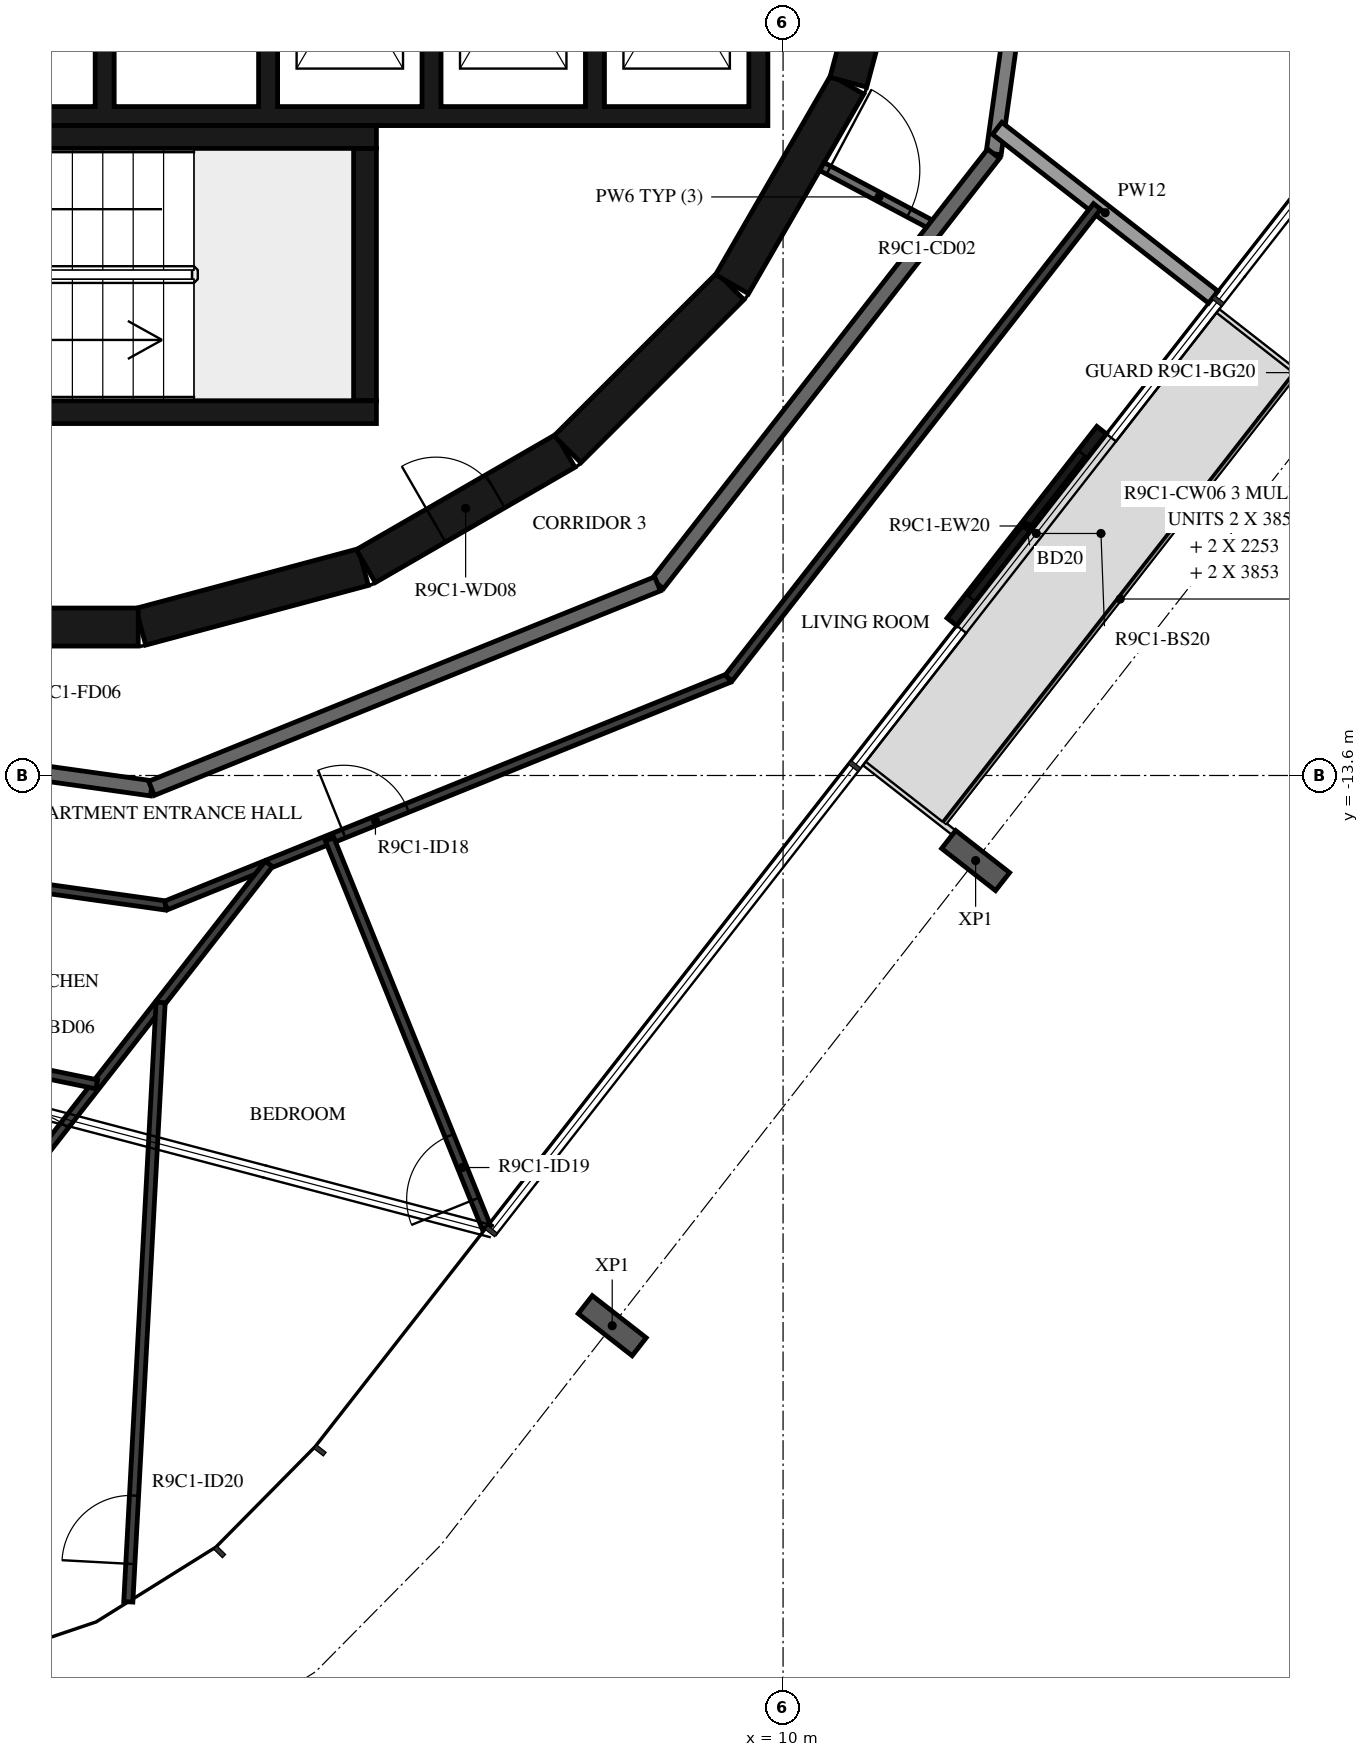
"""IFC4 building model, lengths in metres.
Left out: names, types, materials, properties, quantities, classifications, styles, units other than length and angle.
Written with IfcOpenShell. Run it as: python <this file> out.ifc"""

import sys

from ifc_helpers import new_model, si_unit, direction, frame, frame_2d, origin, origin_2d, place, context, subcontext, project, spatial, polyline, rectangle, i_section, outline, extrude, element, fill, save


model = new_model("IFC4")
c1 = context("Model", 3, precision=1e-05, world=origin(), true_north=direction((0.0, 1.0)))
c2 = subcontext(c1, "Body", "Model", "MODEL_VIEW")
j1 = project(units=[si_unit("LENGTHUNIT", "METRE"), si_unit("PLANEANGLEUNIT", "RADIAN")], contexts=[c1])
p1 = place(None, origin())
s1 = spatial("IfcSite", under=j1, at=p1, CompositionType="ELEMENT")
p2 = place(p1, origin())
s2 = spatial("IfcBuilding", under=s1, at=p2, CompositionType="ELEMENT")
p3 = place(p2, frame((0.0, 0.0, 357.5)))
s3 = spatial("IfcBuildingStorey", under=s2, at=p3, CompositionType="ELEMENT", Elevation=357.5)
for number, where, z_axis, x_axis in (
    (1, (7.752, -20.839, -0.38), (0.0, 0.0, 1.0), (-0.616, -0.788, 0.0)),
    (2, (12.533, -14.719, -0.38), (0.0, 0.0, 1.0), (-0.616, -0.788, 0.0)),
):
    element("IfcColumn", number, at=place(p3, frame(where, z_axis=z_axis, x_axis=x_axis)), inside=s3, PredefinedType="COLUMN", context=c2, shape_type="SweptSolid", body=[
        extrude(i_section(OverallWidth=0.3, OverallDepth=0.9, WebThickness=0.019, FlangeThickness=0.035, FilletRadius=0.03, at=origin_2d()), origin(), (0.0, 0.0, 1.0), 3.5),
    ])
p4 = place(p3, frame((12.221, -11.578, 0.0), z_axis=(0.0, 0.0, 1.0), x_axis=(0.615666248856, 0.788007024093, 0.0)))
e3 = element("IfcWall", 3, at=p4, inside=s3, PredefinedType="STANDARD", context=c2, shape_type="SweptSolid", body=[
    extrude(rectangle(XDim=3.2, YDim=0.16, at=frame_2d((1.6, 0.0))), origin(), (0.0, 0.0, 1.0), 3.12),
])
p5 = place(p4, frame((0.4, 0.0, 0.0)))
e4 = element("IfcOpeningElement", 4, at=p5, cuts=e3, PredefinedType="OPENING", context=c2, shape_type="SweptSolid", body=[
    extrude(rectangle(XDim=2.4, YDim=2.4, at=frame_2d((1.2, 1.2))), frame((0.0, 0.09, 0.0), z_axis=(0.0, -1.0, 0.0), x_axis=(1.0, 0.0, 0.0)), (0.0, 0.0, 1.0), 0.18),
])
p6 = place(p3, frame((1.55, -11.643, 0.0), z_axis=(0.0, 0.0, 1.0), x_axis=(0.965948410781, 0.258734743916, 0.0)))
e5 = element("IfcWall", 5, at=p6, inside=s3, PredefinedType="SHEAR", context=c2, shape_type="SweptSolid", body=[
    extrude(rectangle(XDim=3.033, YDim=0.5, at=frame_2d((1.516, 0.0))), origin(), (0.0, 0.0, 1.0), 3.12),
])
p7 = place(p3, frame((4.51, -10.845, 0.0), z_axis=(0.0, 0.0, 1.0), x_axis=(0.865975092491, 0.500087131594, 0.0)))
e6 = element("IfcWall", 6, at=p7, inside=s3, PredefinedType="SHEAR", context=c2, shape_type="SweptSolid", body=[
    extrude(rectangle(XDim=3.033, YDim=0.5, at=frame_2d((1.516, 0.0))), origin(), (0.0, 0.0, 1.0), 3.12),
])
p8 = place(p7, frame((1.066, 0.0, 0.0)))
e7 = element("IfcOpeningElement", 7, at=p8, cuts=e6, PredefinedType="OPENING", context=c2, shape_type="SweptSolid", body=[
    extrude(rectangle(XDim=0.9, YDim=2.1, at=frame_2d((0.45, 1.05))), frame((0.0, 0.26, 0.0), z_axis=(0.0, -1.0, 0.0), x_axis=(1.0, 0.0, 0.0)), (0.0, 0.0, 1.0), 0.52),
])
p9 = place(p3, frame((7.164, -9.308, 0.0), z_axis=(0.0, 0.0, 1.0), x_axis=(0.707106781187, 0.707106781187, 0.0)))
e8 = element("IfcWall", 8, at=p9, inside=s3, PredefinedType="SHEAR", context=c2, shape_type="SweptSolid", body=[
    extrude(rectangle(XDim=3.032, YDim=0.5, at=frame_2d((1.516, 0.0))), origin(), (0.0, 0.0, 1.0), 3.12),
])
for number, where, z_axis, x_axis in (
    (9, (9.329, -7.137, 0.0), (0.0, 0.0, 1.0), (0.5, 0.866, 0.0)),
    (10, (10.858, -4.479, 0.0), (0.0, 0.0, 1.0), (0.259, 0.966, 0.0)),
):
    element("IfcWall", number, at=place(p3, frame(where, z_axis=z_axis, x_axis=x_axis)), inside=s3, PredefinedType="SHEAR", context=c2, shape_type="SweptSolid", body=[
        extrude(rectangle(XDim=3.033, YDim=0.5, at=frame_2d((1.516, 0.0))), origin(), (0.0, 0.0, 1.0), 3.12),
    ])
p10 = place(p3, frame((-1.516, -11.647, 0.0), z_axis=(0.0, 0.0, 1.0), x_axis=(1.0, 0.0, 0.0)))
e11 = element("IfcWall", 11, at=p10, inside=s3, PredefinedType="SHEAR", context=c2, shape_type="SweptSolid", body=[
    extrude(rectangle(XDim=3.033, YDim=0.5, at=frame_2d((1.516, 0.0))), origin(), (0.0, 0.0, 1.0), 3.12),
])
p11 = place(p10, frame((0.016, 0.0, 0.0)))
e12 = element("IfcOpeningElement", 12, at=p11, cuts=e11, PredefinedType="OPENING", context=c2, shape_type="SweptSolid", body=[
    extrude(rectangle(XDim=1.2, YDim=2.1, at=frame_2d((0.6, 1.05))), frame((0.0, 0.26, 0.0), z_axis=(0.0, -1.0, 0.0), x_axis=(1.0, 0.0, 0.0)), (0.0, 0.0, 1.0), 0.52),
])
p12 = place(p3, frame((-2.4, -5.2, 0.0), z_axis=(0.0, 0.0, 1.0), x_axis=(1.0, 0.0, 0.0)))
e13 = element("IfcWall", 13, at=p12, inside=s3, PredefinedType="SHEAR", context=c2, shape_type="SweptSolid", body=[
    extrude(rectangle(XDim=7.05, YDim=0.3, at=frame_2d((3.525, 0.0))), origin(), (0.0, 0.0, 1.0), 3.12),
])
p13 = place(p3, frame((4.5, -8.67, 0.0), z_axis=(0.0, 0.0, 1.0), x_axis=(0.0, 1.0, 0.0)))
e14 = element("IfcWall", 14, at=p13, inside=s3, PredefinedType="SHEAR", context=c2, shape_type="SweptSolid", body=[
    extrude(rectangle(XDim=3.32, YDim=0.3, at=frame_2d((1.66, 0.0))), origin(), (0.0, 0.0, 1.0), 3.12),
])
p14 = place(p3, frame((0.1, -8.82, 0.0), z_axis=(0.0, 0.0, 1.0), x_axis=(1.0, 0.0, 0.0)))
e15 = element("IfcWall", 15, at=p14, inside=s3, PredefinedType="SHEAR", context=c2, shape_type="SweptSolid", body=[
    extrude(rectangle(XDim=4.55, YDim=0.3, at=frame_2d((2.275, 0.0))), origin(), (0.0, 0.0, 1.0), 3.12),
])
p15 = place(p3, origin())
e16 = element("IfcWall", 16, at=p15, inside=s3, PredefinedType="SHEAR", context=c2, shape_type="SweptSolid", body=[
    extrude(outline(polyline([(9.8, -5.05), (9.8, -4.8), (9.8, -1.9), (9.55, -1.9), (9.55, -4.8), (7.65, -4.8), (7.65, -1.9), (7.4, -1.9), (7.4, -4.8), (5.5, -4.8), (5.5, -1.9), (5.25, -1.9), (5.25, -4.8), (3.35, -4.8), (3.35, -1.9), (3.1, -1.9), (3.1, -4.8), (1.2, -4.8), (1.2, -1.9), (0.95, -1.9), (0.95, -4.8), (-0.95, -4.8), (-0.95, -1.9), (-1.2, -1.9), (-1.2, -4.8), (-3.1, -4.8), (-3.1, -1.9), (-3.35, -1.9), (-3.35, -4.8), (-5.25, -4.8), (-5.25, -1.9), (-5.5, -1.9), (-5.5, -4.8), (-9.55, -4.8), (-9.55, -1.9), (-9.8, -1.9), (-9.8, -4.8), (-9.8, -5.05), (9.8, -5.05)])), origin(), (0.0, 0.0, 1.0), 3.12),
])
p16 = place(p3, frame((10.511, -5.589, 0.0), z_axis=(0.0, 0.0, 1.0), x_axis=(0.882959677414, -0.469448834337, 0.0)))
e17 = element("IfcWall", 17, at=p16, inside=s3, PredefinedType="PARTITIONING", context=c2, shape_type="SweptSolid", body=[
    extrude(rectangle(XDim=1.702, YDim=0.12, at=frame_2d((0.851, 0.0))), origin(), (0.0, 0.0, 1.0), 3.12),
])
p17 = place(p16, frame((0.1, 0.0, 0.0)))
e18 = element("IfcOpeningElement", 18, at=p17, cuts=e17, PredefinedType="OPENING", context=c2, shape_type="SweptSolid", body=[
    extrude(rectangle(XDim=1.2, YDim=2.1, at=frame_2d((0.6, 1.05))), frame((0.0, 0.07, 0.0), z_axis=(0.0, -1.0, 0.0), x_axis=(1.0, 0.0, 0.0)), (0.0, 0.0, 1.0), 0.14),
])
p18 = place(p3, frame((12.77, -5.42, 0.0), z_axis=(0.0, 0.0, 1.0), x_axis=(0.139155334385, 0.990270565508, 0.0)))
e19 = element("IfcWall", 19, at=p18, inside=s3, PredefinedType="STANDARD", context=c2, shape_type="SweptSolid", body=[
    extrude(rectangle(XDim=7.181, YDim=0.2, at=frame_2d((3.59, 0.0))), origin(), (0.0, 0.0, 1.0), 3.12),
])
p19 = place(p18, frame((2.039, 0.0, 0.0)))
e20 = element("IfcOpeningElement", 20, at=p19, cuts=e19, PredefinedType="OPENING", context=c2, shape_type="SweptSolid", body=[
    extrude(rectangle(XDim=1.8, YDim=2.1, at=frame_2d((0.9, 1.05))), frame((0.0, 0.11, 0.0), z_axis=(0.0, -1.0, 0.0), x_axis=(1.0, 0.0, 0.0)), (0.0, 0.0, 1.0), 0.22),
])
p20 = place(p3, frame((8.349, -11.079, 0.0), z_axis=(0.0, 0.0, 1.0), x_axis=(0.615669112324, 0.78800478687, 0.0)))
e21 = element("IfcWall", 21, at=p20, inside=s3, PredefinedType="STANDARD", context=c2, shape_type="SweptSolid", body=[
    extrude(rectangle(XDim=7.181, YDim=0.2, at=frame_2d((3.591, 0.0))), origin(), (0.0, 0.0, 1.0), 3.12),
])
p21 = place(p3, frame((-5.42, -12.77, 0.0), z_axis=(0.0, 0.0, 1.0), x_axis=(0.990270565508, -0.139155334385, 0.0)))
e22 = element("IfcWall", 22, at=p21, inside=s3, PredefinedType="STANDARD", context=c2, shape_type="SweptSolid", body=[
    extrude(rectangle(XDim=7.181, YDim=0.2, at=frame_2d((3.59, 0.0))), origin(), (0.0, 0.0, 1.0), 3.12),
])
p22 = place(p21, frame((2.39, 0.0, 0.0)))
e23 = element("IfcOpeningElement", 23, at=p22, cuts=e22, PredefinedType="OPENING", context=c2, shape_type="SweptSolid", body=[
    extrude(rectangle(XDim=1.0, YDim=2.1, at=frame_2d((0.5, 1.05))), frame((0.0, 0.11, 0.0), z_axis=(0.0, -1.0, 0.0), x_axis=(1.0, 0.0, 0.0)), (0.0, 0.0, 1.0), 0.22),
])
p23 = place(p21, frame((4.091, 0.0, 0.0)))
e24 = element("IfcOpeningElement", 24, at=p23, cuts=e22, PredefinedType="OPENING", context=c2, shape_type="SweptSolid", body=[
    extrude(rectangle(XDim=1.0, YDim=2.1, at=frame_2d((0.5, 1.05))), frame((0.0, 0.11, 0.0), z_axis=(0.0, -1.0, 0.0), x_axis=(1.0, 0.0, 0.0)), (0.0, 0.0, 1.0), 0.22),
])
p24 = place(p3, frame((1.691, -13.769, 0.0), z_axis=(0.0, 0.0, 1.0), x_axis=(0.92717916932, 0.374618189599, 0.0)))
e25 = element("IfcWall", 25, at=p24, inside=s3, PredefinedType="STANDARD", context=c2, shape_type="SweptSolid", body=[
    extrude(rectangle(XDim=7.181, YDim=0.2, at=frame_2d((3.591, 0.0))), origin(), (0.0, 0.0, 1.0), 3.12),
])
p25 = place(p3, frame((12.817, -5.086, 0.0), z_axis=(0.0, 0.0, 1.0), x_axis=(0.787994616725, -0.615682129034, 0.0)))
e26 = element("IfcWall", 26, at=p25, inside=s3, PredefinedType="STANDARD", context=c2, shape_type="SweptSolid", body=[
    extrude(rectangle(XDim=3.607, YDim=0.2, at=frame_2d((1.804, 0.0))), origin(), (0.0, 0.0, 1.0), 2.73),
])
p26 = place(p3, frame((-3.688, -14.528, 0.0), z_axis=(0.0, 0.0, 1.0), x_axis=(0.990273413633, -0.139135064782, 0.0)))
e27 = element("IfcWall", 27, at=p26, inside=s3, PredefinedType="PARTITIONING", context=c2, shape_type="SweptSolid", body=[
    extrude(rectangle(XDim=5.622, YDim=0.12, at=frame_2d((2.811, 0.0))), origin(), (0.0, 0.0, 1.0), 3.12),
])
p27 = place(p26, frame((0.2, 0.0, 0.0)))
e28 = element("IfcOpeningElement", 28, at=p27, cuts=e27, PredefinedType="OPENING", context=c2, shape_type="SweptSolid", body=[
    extrude(rectangle(XDim=0.8, YDim=2.1, at=frame_2d((0.4, 1.05))), frame((0.0, 0.07, 0.0), z_axis=(0.0, -1.0, 0.0), x_axis=(1.0, 0.0, 0.0)), (0.0, 0.0, 1.0), 0.14),
])
p28 = place(p26, frame((1.83, 0.0, 0.0)))
e29 = element("IfcOpeningElement", 29, at=p28, cuts=e27, PredefinedType="OPENING", context=c2, shape_type="SweptSolid", body=[
    extrude(rectangle(XDim=0.9, YDim=2.1, at=frame_2d((0.45, 1.05))), frame((0.0, 0.07, 0.0), z_axis=(0.0, -1.0, 0.0), x_axis=(1.0, 0.0, 0.0)), (0.0, 0.0, 1.0), 0.14),
])
p29 = place(p3, frame((1.88, -15.311, 0.0), z_axis=(0.0, 0.0, 1.0), x_axis=(0.927184866592, 0.374604088557, 0.0)))
e30 = element("IfcWall", 30, at=p29, inside=s3, PredefinedType="PARTITIONING", context=c2, shape_type="SweptSolid", body=[
    extrude(rectangle(XDim=7.985, YDim=0.12, at=frame_2d((3.993, 0.0))), origin(), (0.0, 0.0, 1.0), 3.12),
])
p30 = place(p29, frame((2.524, 0.0, 0.0)))
e31 = element("IfcOpeningElement", 31, at=p30, cuts=e30, PredefinedType="OPENING", context=c2, shape_type="SweptSolid", body=[
    extrude(rectangle(XDim=0.9, YDim=2.1, at=frame_2d((0.45, 1.05))), frame((0.0, 0.07, 0.0), z_axis=(0.0, -1.0, 0.0), x_axis=(1.0, 0.0, 0.0)), (0.0, 0.0, 1.0), 0.14),
])
p31 = place(p3, frame((9.283, -12.319, 0.0), z_axis=(0.0, 0.0, 1.0), x_axis=(0.615666903036, 0.788006512985, 0.0)))
e32 = element("IfcWall", 32, at=p31, inside=s3, PredefinedType="PARTITIONING", context=c2, shape_type="SweptSolid", body=[
    extrude(rectangle(XDim=7.875, YDim=0.12, at=frame_2d((3.938, 0.0))), origin(), (0.0, 0.0, 1.0), 3.12),
])
p32 = place(p3, frame((-0.067, -18.99, 0.0), z_axis=(0.0, 0.0, 1.0), x_axis=(0.615678487989, 0.787997461562, 0.0)))
e33 = element("IfcWall", 33, at=p32, inside=s3, PredefinedType="PARTITIONING", context=c2, shape_type="SweptSolid", body=[
    extrude(rectangle(XDim=5.364, YDim=0.12, at=frame_2d((2.682, 0.0))), origin(), (0.0, 0.0, 1.0), 3.12),
])
p33 = place(p32, frame((0.2, 0.0, 0.0)))
e34 = element("IfcOpeningElement", 34, at=p33, cuts=e33, PredefinedType="OPENING", context=c2, shape_type="SweptSolid", body=[
    extrude(rectangle(XDim=0.8, YDim=2.1, at=frame_2d((0.4, 1.05))), frame((0.0, 0.07, 0.0), z_axis=(0.0, -1.0, 0.0), x_axis=(1.0, 0.0, 0.0)), (0.0, 0.0, 1.0), 0.14),
])
p34 = place(p3, frame((0.969, -17.663, 0.0), z_axis=(0.0, 0.0, 1.0), x_axis=(-0.979358667558, 0.202130156776, 0.0)))
e35 = element("IfcWall", 35, at=p34, inside=s3, PredefinedType="PARTITIONING", context=c2, shape_type="SweptSolid", body=[
    extrude(rectangle(XDim=2.021, YDim=0.12, at=frame_2d((1.01, 0.0))), origin(), (0.0, 0.0, 1.0), 3.12),
])
p35 = place(p3, frame((1.386, -24.471, 0.0), z_axis=(0.0, 0.0, 1.0), x_axis=(0.053855287289, 0.998548750954, 0.0)))
e36 = element("IfcWall", 36, at=p35, inside=s3, PredefinedType="PARTITIONING", context=c2, shape_type="SweptSolid", body=[
    extrude(rectangle(XDim=7.897, YDim=0.12, at=frame_2d((3.948, 0.0))), origin(), (0.0, 0.0, 1.0), 3.12),
])
p36 = place(p35, frame((0.5, 0.0, 0.0)))
e37 = element("IfcOpeningElement", 37, at=p36, cuts=e36, PredefinedType="OPENING", context=c2, shape_type="SweptSolid", body=[
    extrude(rectangle(XDim=0.9, YDim=2.1, at=frame_2d((0.45, 1.05))), frame((0.0, 0.07, 0.0), z_axis=(0.0, -1.0, 0.0), x_axis=(1.0, 0.0, 0.0)), (0.0, 0.0, 1.0), 0.14),
])
p37 = place(p3, frame((6.097, -19.546, 0.0), z_axis=(0.0, 0.0, 1.0), x_axis=(-0.374591330213, 0.927190021155, 0.0)))
e38 = element("IfcWall", 38, at=p37, inside=s3, PredefinedType="PARTITIONING", context=c2, shape_type="SweptSolid", body=[
    extrude(rectangle(XDim=5.507, YDim=0.12, at=frame_2d((2.753, 0.0))), origin(), (0.0, 0.0, 1.0), 3.12),
])
p38 = place(p37, frame((0.4, 0.0, 0.0)))
e39 = element("IfcOpeningElement", 39, at=p38, cuts=e38, PredefinedType="OPENING", context=c2, shape_type="SweptSolid", body=[
    extrude(rectangle(XDim=0.9, YDim=2.1, at=frame_2d((0.45, 1.05))), frame((0.0, 0.07, 0.0), z_axis=(0.0, -1.0, 0.0), x_axis=(1.0, 0.0, 0.0)), (0.0, 0.0, 1.0), 0.14),
])
p39 = place(p5, origin())
e40 = element("IfcDoor", 40, at=p39, inside=s3, OperationType="DOUBLE_DOOR_SLIDING", PredefinedType="DOOR", context=c2, shape_type="SweptSolid", body=[
    extrude(rectangle(XDim=2.4, YDim=2.4, at=frame_2d((1.2, 1.2))), frame((0.0, 0.025, 0.0), z_axis=(0.0, -1.0, 0.0), x_axis=(1.0, 0.0, 0.0)), (0.0, 0.0, 1.0), 0.05),
])
fill(e4, e40)
p40 = place(p8, origin())
e41 = element("IfcDoor", 41, at=p40, inside=s3, OperationType="SINGLE_SWING_RIGHT", PredefinedType="DOOR", context=c2, shape_type="SweptSolid", body=[
    extrude(rectangle(XDim=0.9, YDim=2.1, at=frame_2d((0.45, 1.05))), frame((0.0, 0.025, 0.0), z_axis=(0.0, -1.0, 0.0), x_axis=(1.0, 0.0, 0.0)), (0.0, 0.0, 1.0), 0.05),
])
fill(e7, e41)
p41 = place(p30, origin())
e42 = element("IfcDoor", 42, at=p41, inside=s3, OperationType="SINGLE_SWING_LEFT", PredefinedType="DOOR", context=c2, shape_type="SweptSolid", body=[
    extrude(rectangle(XDim=0.9, YDim=2.1, at=frame_2d((0.45, 1.05))), frame((0.0, 0.025, 0.0), z_axis=(0.0, -1.0, 0.0), x_axis=(1.0, 0.0, 0.0)), (0.0, 0.0, 1.0), 0.05),
])
fill(e31, e42)
p42 = place(p38, origin())
e43 = element("IfcDoor", 43, at=p42, inside=s3, OperationType="SINGLE_SWING_LEFT", PredefinedType="DOOR", context=c2, shape_type="SweptSolid", body=[
    extrude(rectangle(XDim=0.9, YDim=2.1, at=frame_2d((0.45, 1.05))), frame((0.0, 0.025, 0.0), z_axis=(0.0, -1.0, 0.0), x_axis=(1.0, 0.0, 0.0)), (0.0, 0.0, 1.0), 0.05),
])
fill(e39, e43)
p43 = place(p36, origin())
e44 = element("IfcDoor", 44, at=p43, inside=s3, OperationType="SINGLE_SWING_LEFT", PredefinedType="DOOR", context=c2, shape_type="SweptSolid", body=[
    extrude(rectangle(XDim=0.9, YDim=2.1, at=frame_2d((0.45, 1.05))), frame((0.0, 0.025, 0.0), z_axis=(0.0, -1.0, 0.0), x_axis=(1.0, 0.0, 0.0)), (0.0, 0.0, 1.0), 0.05),
])
fill(e37, e44)
p44 = place(p33, origin())
e45 = element("IfcDoor", 45, at=p44, inside=s3, OperationType="SINGLE_SWING_RIGHT", PredefinedType="DOOR", context=c2, shape_type="SweptSolid", body=[
    extrude(rectangle(XDim=0.8, YDim=2.1, at=frame_2d((0.4, 1.05))), frame((0.0, 0.025, 0.0), z_axis=(0.0, -1.0, 0.0), x_axis=(1.0, 0.0, 0.0)), (0.0, 0.0, 1.0), 0.05),
])
fill(e34, e45)
p45 = place(p17, origin())
e46 = element("IfcDoor", 46, at=p45, inside=s3, OperationType="DOUBLE_DOOR_SINGLE_SWING", PredefinedType="DOOR", context=c2, shape_type="SweptSolid", body=[
    extrude(rectangle(XDim=1.2, YDim=2.1, at=frame_2d((0.6, 1.05))), frame((0.0, 0.025, 0.0), z_axis=(0.0, -1.0, 0.0), x_axis=(1.0, 0.0, 0.0)), (0.0, 0.0, 1.0), 0.05),
])
fill(e18, e46)
save(model, sys.argv[1])
